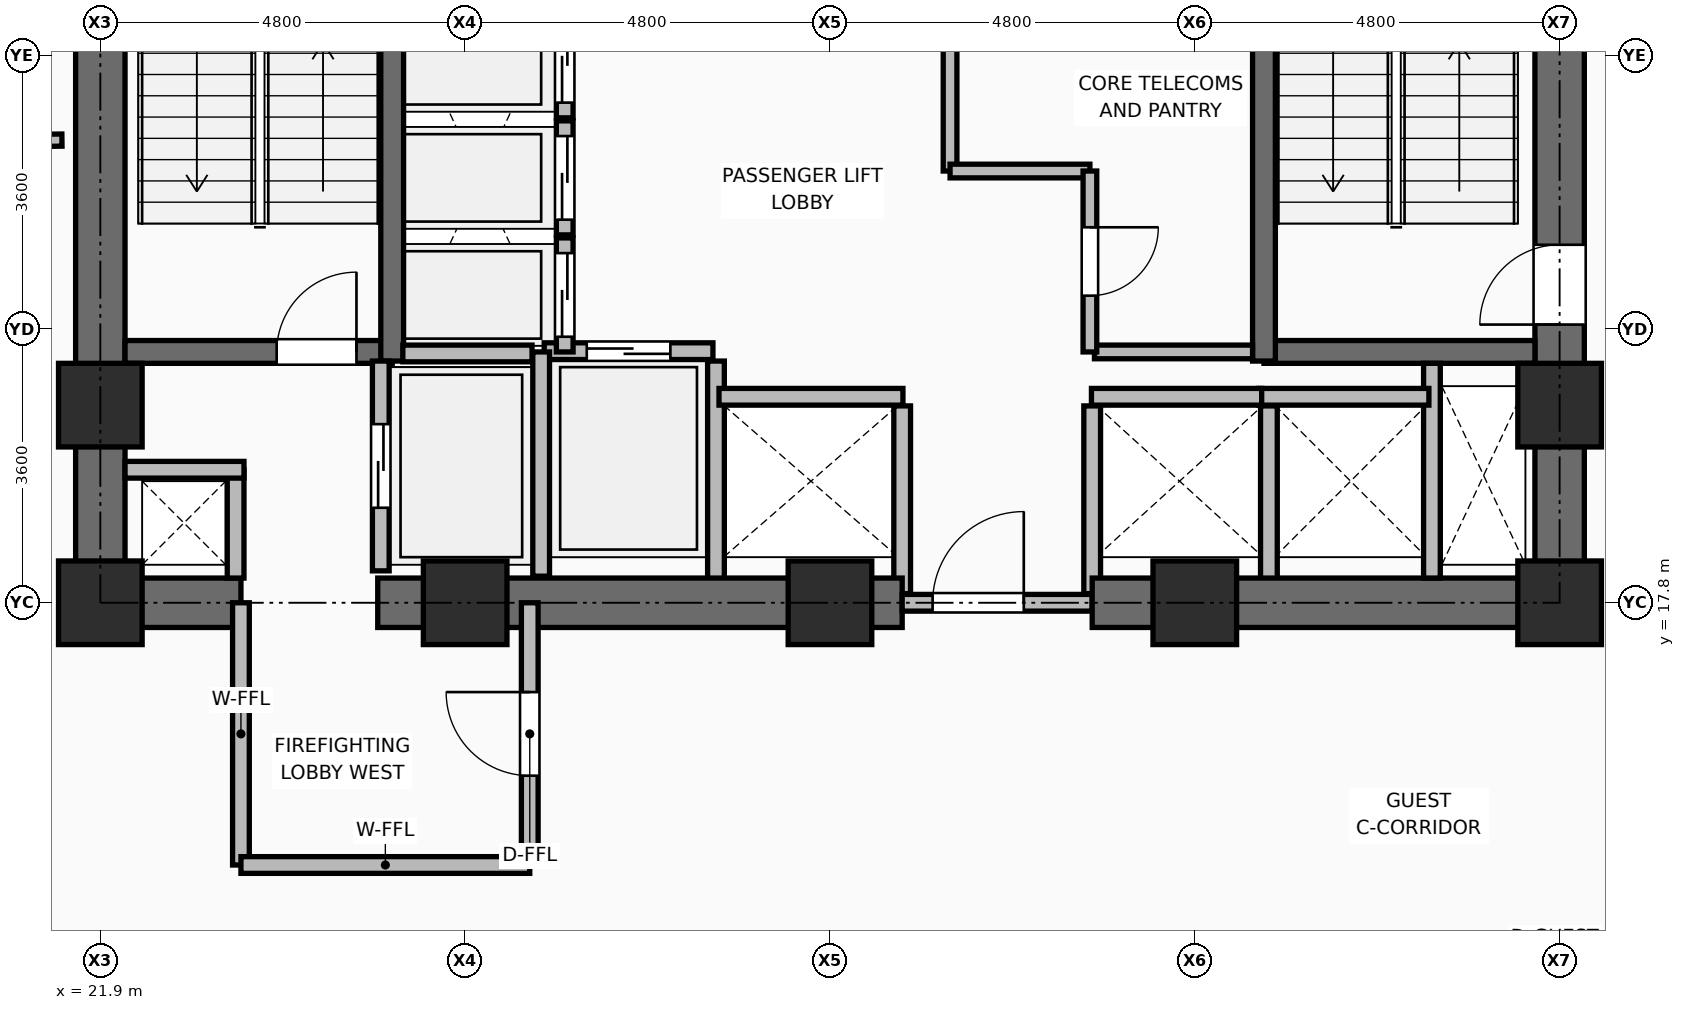
"""IFC4 building model, lengths in metres.
Left out: names, types, materials, properties, quantities, classifications, styles, units other than length and angle.
Written with IfcOpenShell. Run it as: python <this file> out.ifc"""

import sys

from ifc_helpers import new_model, si_unit, direction, frame, frame_2d, origin, origin_2d, place, context, subcontext, project, spatial, rectangle, extrude, element, fill, save


model = new_model("IFC4")
c1 = context("Model", 3, precision=1e-05, world=origin(), true_north=direction((0.0, 1.0)))
c2 = subcontext(c1, "Body", "Model", "MODEL_VIEW")
j1 = project(units=[si_unit("LENGTHUNIT", "METRE"), si_unit("PLANEANGLEUNIT", "RADIAN")], contexts=[c1])
p1 = place(None, origin())
s1 = spatial("IfcSite", under=j1, at=p1, CompositionType="ELEMENT")
p2 = place(p1, origin())
s2 = spatial("IfcBuilding", under=s1, at=p2, CompositionType="ELEMENT")
p3 = place(p2, frame((0.0, 0.0, 49.5)))
s3 = spatial("IfcBuildingStorey", under=s2, at=p3, CompositionType="ELEMENT", Elevation=49.5)
for number, where, z_axis, x_axis in (
    (1, (21.9, 17.8, 0.0), (0.0, 0.0, 1.0), (1.0, 0.0, 0.0)),
    (2, (26.7, 17.8, 0.0), (0.0, 0.0, 1.0), (1.0, 0.0, 0.0)),
    (3, (31.5, 17.8, 0.0), (0.0, 0.0, 1.0), (1.0, 0.0, 0.0)),
    (4, (36.3, 17.8, 0.0), (0.0, 0.0, 1.0), (1.0, 0.0, 0.0)),
    (5, (41.1, 17.8, 0.0), (0.0, 0.0, 1.0), (1.0, 0.0, 0.0)),
    (6, (21.9, 20.4, 0.0), (0.0, 0.0, 1.0), (1.0, 0.0, 0.0)),
    (7, (41.1, 20.4, 0.0), (0.0, 0.0, 1.0), (1.0, 0.0, 0.0)),
):
    element("IfcColumn", number, at=place(p3, frame(where, z_axis=z_axis, x_axis=x_axis)), inside=s3, PredefinedType="COLUMN", context=c2, shape_type="SweptSolid", body=[
        extrude(rectangle(XDim=1.1, YDim=1.1, at=origin_2d()), origin(), (0.0, 0.0, 1.0), 3.75),
    ])
p4 = place(p3, frame((30.0, 18.08, 0.0), z_axis=(0.0, 0.0, 1.0), x_axis=(0.0, 1.0, 0.0)))
e8 = element("IfcWall", 8, at=p4, inside=s3, PredefinedType="PARTITIONING", context=c2, shape_type="SweptSolid", body=[
    extrude(rectangle(XDim=2.9, YDim=0.22, at=frame_2d((1.45, 0.0))), origin(), (0.0, 0.0, 1.0), 3.545),
])
for number, where, z_axis, x_axis in (
    (9, (32.45, 17.92, 0.0), (0.0, 0.0, 1.0), (0.0, 1.0, 0.0)),
    (10, (34.95, 17.92, 0.0), (0.0, 0.0, 1.0), (0.0, 1.0, 0.0)),
):
    element("IfcWall", number, at=place(p3, frame(where, z_axis=z_axis, x_axis=x_axis)), inside=s3, PredefinedType="PARTITIONING", context=c2, shape_type="SweptSolid", body=[
        extrude(rectangle(XDim=2.47, YDim=0.22, at=frame_2d((1.235, 0.0))), origin(), (0.0, 0.0, 1.0), 2.928),
    ])
p5 = place(p3, frame((37.275, 18.08, 0.0), z_axis=(0.0, 0.0, 1.0), x_axis=(0.0, 1.0, 0.0)))
e11 = element("IfcWall", 11, at=p5, inside=s3, PredefinedType="PARTITIONING", context=c2, shape_type="SweptSolid", body=[
    extrude(rectangle(XDim=2.31, YDim=0.22, at=frame_2d((1.155, 0.0))), origin(), (0.0, 0.0, 1.0), 3.545),
])
p6 = place(p3, frame((21.575, 17.8, 0.0), z_axis=(0.0, 0.0, 1.0), x_axis=(1.0, 0.0, 0.0)))
e12 = element("IfcWall", 12, at=p6, inside=s3, PredefinedType="SHEAR", context=c2, shape_type="SweptSolid", body=[
    extrude(rectangle(XDim=2.175, YDim=0.65, at=frame_2d((1.087, 0.0))), origin(), (0.0, 0.0, 1.0), 3.57),
])
p7 = place(p3, frame((25.55, 17.8, 0.0), z_axis=(0.0, 0.0, 1.0), x_axis=(1.0, 0.0, 0.0)))
e13 = element("IfcWall", 13, at=p7, inside=s3, PredefinedType="SHEAR", context=c2, shape_type="SweptSolid", body=[
    extrude(rectangle(XDim=6.9, YDim=0.65, at=frame_2d((3.45, 0.0))), origin(), (0.0, 0.0, 1.0), 3.57),
])
p8 = place(p3, frame((32.45, 17.8, 0.0), z_axis=(0.0, 0.0, 1.0), x_axis=(1.0, 0.0, 0.0)))
e14 = element("IfcWall", 14, at=p8, inside=s3, PredefinedType="PARTITIONING", context=c2, shape_type="SweptSolid", body=[
    extrude(rectangle(XDim=2.5, YDim=0.22, at=frame_2d((1.25, 0.0))), origin(), (0.0, 0.0, 1.0), 2.928),
])
p9 = place(p8, frame((0.4, 0.0, 0.0)))
e15 = element("IfcOpeningElement", 15, at=p9, cuts=e14, PredefinedType="OPENING", context=c2, shape_type="SweptSolid", body=[
    extrude(rectangle(XDim=1.2, YDim=2.1, at=frame_2d((0.6, 1.05))), frame((0.0, 0.12, 0.0), z_axis=(0.0, -1.0, 0.0), x_axis=(1.0, 0.0, 0.0)), (0.0, 0.0, 1.0), 0.24),
])
p10 = place(p3, frame((34.95, 17.8, 0.0), z_axis=(0.0, 0.0, 1.0), x_axis=(1.0, 0.0, 0.0)))
e16 = element("IfcWall", 16, at=p10, inside=s3, PredefinedType="SHEAR", context=c2, shape_type="SweptSolid", body=[
    extrude(rectangle(XDim=6.475, YDim=0.65, at=frame_2d((3.238, 0.0))), origin(), (0.0, 0.0, 1.0), 3.57),
])
p11 = place(p3, frame((21.9, 18.125, 0.0), z_axis=(0.0, 0.0, 1.0), x_axis=(0.0, 1.0, 0.0)))
e17 = element("IfcWall", 17, at=p11, inside=s3, PredefinedType="SHEAR", context=c2, shape_type="SweptSolid", body=[
    extrude(rectangle(XDim=14.0, YDim=0.65, at=frame_2d((7.0, 0.0))), origin(), (0.0, 0.0, 1.0), 3.57),
])
p12 = place(p3, frame((41.1, 18.125, 0.0), z_axis=(0.0, 0.0, 1.0), x_axis=(0.0, 1.0, 0.0)))
e18 = element("IfcWall", 18, at=p12, inside=s3, PredefinedType="SHEAR", context=c2, shape_type="SweptSolid", body=[
    extrude(rectangle(XDim=14.0, YDim=0.65, at=frame_2d((7.0, 0.0))), origin(), (0.0, 0.0, 1.0), 3.57),
])
p13 = place(p12, frame((3.335, 0.0, 0.0)))
e19 = element("IfcOpeningElement", 19, at=p13, cuts=e18, PredefinedType="OPENING", context=c2, shape_type="SweptSolid", body=[
    extrude(rectangle(XDim=1.05, YDim=2.1, at=frame_2d((0.525, 1.05))), frame((0.0, 0.335, 0.0), z_axis=(0.0, -1.0, 0.0), x_axis=(1.0, 0.0, 0.0)), (0.0, 0.0, 1.0), 0.67),
])
p14 = place(p3, frame((22.225, 21.1, 0.0), z_axis=(0.0, 0.0, 1.0), x_axis=(1.0, 0.0, 0.0)))
e20 = element("IfcWall", 20, at=p14, inside=s3, PredefinedType="SHEAR", context=c2, shape_type="SweptSolid", body=[
    extrude(rectangle(XDim=3.515, YDim=0.3, at=frame_2d((1.757, 0.0))), origin(), (0.0, 0.0, 1.0), 3.57),
])
p15 = place(p14, frame((1.995, 0.0, 0.0)))
e21 = element("IfcOpeningElement", 21, at=p15, cuts=e20, PredefinedType="OPENING", context=c2, shape_type="SweptSolid", body=[
    extrude(rectangle(XDim=1.05, YDim=2.1, at=frame_2d((0.525, 1.05))), frame((0.0, 0.16, 0.0), z_axis=(0.0, -1.0, 0.0), x_axis=(1.0, 0.0, 0.0)), (0.0, 0.0, 1.0), 0.32),
])
p16 = place(p3, frame((25.74, 20.98, 0.0), z_axis=(0.0, 0.0, 1.0), x_axis=(0.0, 1.0, 0.0)))
e22 = element("IfcWall", 22, at=p16, inside=s3, PredefinedType="SHEAR", context=c2, shape_type="SweptSolid", body=[
    extrude(rectangle(XDim=7.99, YDim=0.3, at=frame_2d((3.995, 0.0))), origin(), (0.0, 0.0, 1.0), 3.57),
])
p17 = place(p3, frame((37.21, 21.1, 0.0), z_axis=(0.0, 0.0, 1.0), x_axis=(1.0, 0.0, 0.0)))
e23 = element("IfcWall", 23, at=p17, inside=s3, PredefinedType="SHEAR", context=c2, shape_type="SweptSolid", body=[
    extrude(rectangle(XDim=3.565, YDim=0.3, at=frame_2d((1.782, 0.0))), origin(), (0.0, 0.0, 1.0), 3.57),
])
p18 = place(p3, frame((37.21, 20.98, 0.0), z_axis=(0.0, 0.0, 1.0), x_axis=(0.0, 1.0, 0.0)))
e24 = element("IfcWall", 24, at=p18, inside=s3, PredefinedType="SHEAR", context=c2, shape_type="SweptSolid", body=[
    extrude(rectangle(XDim=7.99, YDim=0.3, at=frame_2d((3.995, 0.0))), origin(), (0.0, 0.0, 1.0), 3.57),
])
p19 = place(p3, frame((23.68, 18.125, 0.0), z_axis=(0.0, 0.0, 1.0), x_axis=(0.0, 1.0, 0.0)))
e25 = element("IfcWall", 25, at=p19, inside=s3, PredefinedType="PARTITIONING", context=c2, shape_type="SweptSolid", body=[
    extrude(rectangle(XDim=1.425, YDim=0.22, at=frame_2d((0.712, 0.0))), origin(), (0.0, 0.0, 1.0), 3.55),
])
p20 = place(p3, frame((22.225, 19.55, 0.0), z_axis=(0.0, 0.0, 1.0), x_axis=(1.0, 0.0, 0.0)))
e26 = element("IfcWall", 26, at=p20, inside=s3, PredefinedType="PARTITIONING", context=c2, shape_type="SweptSolid", body=[
    extrude(rectangle(XDim=1.565, YDim=0.22, at=frame_2d((0.782, 0.0))), origin(), (0.0, 0.0, 1.0), 2.595),
])
p21 = place(p3, frame((39.42, 18.125, 0.0), z_axis=(0.0, 0.0, 1.0), x_axis=(0.0, 1.0, 0.0)))
e27 = element("IfcWall", 27, at=p21, inside=s3, PredefinedType="PARTITIONING", context=c2, shape_type="SweptSolid", body=[
    extrude(rectangle(XDim=2.825, YDim=0.22, at=frame_2d((1.413, 0.0))), origin(), (0.0, 0.0, 1.0), 3.55),
])
p22 = place(p3, frame((25.59, 18.22, 0.0), z_axis=(0.0, 0.0, 1.0), x_axis=(0.0, 1.0, 0.0)))
e28 = element("IfcWall", 28, at=p22, inside=s3, PredefinedType="PARTITIONING", context=c2, shape_type="SweptSolid", body=[
    extrude(rectangle(XDim=2.76, YDim=0.22, at=frame_2d((1.38, 0.0))), origin(), (0.0, 0.0, 1.0), 3.55),
])
p23 = place(p22, frame((0.83, 0.0, 0.0)))
e29 = element("IfcOpeningElement", 29, at=p23, cuts=e28, PredefinedType="OPENING", context=c2, shape_type="SweptSolid", body=[
    extrude(rectangle(XDim=1.1, YDim=2.2, at=frame_2d((0.55, 1.1))), frame((0.0, 0.12, 0.0), z_axis=(0.0, -1.0, 0.0), x_axis=(1.0, 0.0, 0.0)), (0.0, 0.0, 1.0), 0.24),
])
p24 = place(p3, frame((27.74, 21.11, 0.0), z_axis=(0.0, 0.0, 1.0), x_axis=(1.0, 0.0, 0.0)))
e30 = element("IfcWall", 30, at=p24, inside=s3, PredefinedType="PARTITIONING", context=c2, shape_type="SweptSolid", body=[
    extrude(rectangle(XDim=2.22, YDim=0.22, at=frame_2d((1.11, 0.0))), origin(), (0.0, 0.0, 1.0), 3.55),
])
p25 = place(p24, frame((0.56, 0.0, 0.0)))
e31 = element("IfcOpeningElement", 31, at=p25, cuts=e30, PredefinedType="OPENING", context=c2, shape_type="SweptSolid", body=[
    extrude(rectangle(XDim=1.1, YDim=2.2, at=frame_2d((0.55, 1.1))), frame((0.0, 0.12, 0.0), z_axis=(0.0, -1.0, 0.0), x_axis=(1.0, 0.0, 0.0)), (0.0, 0.0, 1.0), 0.24),
])
p26 = place(p3, frame((30.04, 20.51, 0.0), z_axis=(0.0, 0.0, 1.0), x_axis=(1.0, 0.0, 0.0)))
e32 = element("IfcWall", 32, at=p26, inside=s3, PredefinedType="PARTITIONING", context=c2, shape_type="SweptSolid", body=[
    extrude(rectangle(XDim=2.42, YDim=0.22, at=frame_2d((1.21, 0.0))), origin(), (0.0, 0.0, 1.0), 3.55),
])
for number, where, z_axis, x_axis in (
    (33, (37.14, 20.51, 0.0), (0.0, 0.0, 1.0), (1.0, 0.0, 0.0)),
    (34, (34.94, 20.51, 0.0), (0.0, 0.0, 1.0), (1.0, 0.0, 0.0)),
):
    element("IfcWall", number, at=place(p3, frame(where, z_axis=z_axis, x_axis=x_axis)), inside=s3, PredefinedType="PARTITIONING", context=c2, shape_type="SweptSolid", body=[
        extrude(rectangle(XDim=2.24, YDim=0.22, at=frame_2d((1.12, 0.0))), origin(), (0.0, 0.0, 1.0), 3.55),
    ])
p27 = place(p3, frame((28.01, 21.1, 0.0), z_axis=(0.0, 0.0, 1.0), x_axis=(0.0, 1.0, 0.0)))
e35 = element("IfcWall", 35, at=p27, inside=s3, PredefinedType="PARTITIONING", context=c2, shape_type="SweptSolid", body=[
    extrude(rectangle(XDim=1.5, YDim=0.22, at=frame_2d((0.75, 0.0))), origin(), (0.0, 0.0, 1.0), 3.55),
])
p28 = place(p27, frame((0.2, 0.0, 0.0)))
e36 = element("IfcOpeningElement", 36, at=p28, cuts=e35, PredefinedType="OPENING", context=c2, shape_type="SweptSolid", body=[
    extrude(rectangle(XDim=1.1, YDim=2.2, at=frame_2d((0.55, 1.1))), frame((0.0, 0.12, 0.0), z_axis=(0.0, -1.0, 0.0), x_axis=(1.0, 0.0, 0.0)), (0.0, 0.0, 1.0), 0.24),
])
p29 = place(p3, frame((28.01, 22.64, 0.0), z_axis=(0.0, 0.0, 1.0), x_axis=(0.0, 1.0, 0.0)))
e37 = element("IfcWall", 37, at=p29, inside=s3, PredefinedType="PARTITIONING", context=c2, shape_type="SweptSolid", body=[
    extrude(rectangle(XDim=1.5, YDim=0.22, at=frame_2d((0.75, 0.0))), origin(), (0.0, 0.0, 1.0), 3.55),
])
p30 = place(p29, frame((0.2, 0.0, 0.0)))
e38 = element("IfcOpeningElement", 38, at=p30, cuts=e37, PredefinedType="OPENING", context=c2, shape_type="SweptSolid", body=[
    extrude(rectangle(XDim=1.1, YDim=2.2, at=frame_2d((0.55, 1.1))), frame((0.0, 0.12, 0.0), z_axis=(0.0, -1.0, 0.0), x_axis=(1.0, 0.0, 0.0)), (0.0, 0.0, 1.0), 0.24),
])
p31 = place(p3, frame((28.01, 24.18, 0.0), z_axis=(0.0, 0.0, 1.0), x_axis=(0.0, 1.0, 0.0)))
e39 = element("IfcWall", 39, at=p31, inside=s3, PredefinedType="PARTITIONING", context=c2, shape_type="SweptSolid", body=[
    extrude(rectangle(XDim=1.5, YDim=0.22, at=frame_2d((0.75, 0.0))), origin(), (0.0, 0.0, 1.0), 3.55),
])
p32 = place(p31, frame((0.2, 0.0, 0.0)))
e40 = element("IfcOpeningElement", 40, at=p32, cuts=e39, PredefinedType="OPENING", context=c2, shape_type="SweptSolid", body=[
    extrude(rectangle(XDim=1.1, YDim=2.2, at=frame_2d((0.55, 1.1))), frame((0.0, 0.12, 0.0), z_axis=(0.0, -1.0, 0.0), x_axis=(1.0, 0.0, 0.0)), (0.0, 0.0, 1.0), 0.24),
])
p33 = place(p3, frame((27.7, 18.15, 0.0), z_axis=(0.0, 0.0, 1.0), x_axis=(0.0, 1.0, 0.0)))
e41 = element("IfcWall", 41, at=p33, inside=s3, PredefinedType="PARTITIONING", context=c2, shape_type="SweptSolid", body=[
    extrude(rectangle(XDim=2.95, YDim=0.22, at=frame_2d((1.475, 0.0))), origin(), (0.0, 0.0, 1.0), 3.55),
])
p34 = place(p3, frame((25.88, 21.08, 0.0), z_axis=(0.0, 0.0, 1.0), x_axis=(1.0, 0.0, 0.0)))
e42 = element("IfcWall", 42, at=p34, inside=s3, PredefinedType="PARTITIONING", context=c2, shape_type="SweptSolid", body=[
    extrude(rectangle(XDim=1.7, YDim=0.22, at=frame_2d((0.85, 0.0))), origin(), (0.0, 0.0, 1.0), 3.55),
])
p35 = place(p3, frame((34.98, 21.1, 0.0), z_axis=(0.0, 0.0, 1.0), x_axis=(1.0, 0.0, 0.0)))
e43 = element("IfcWall", 43, at=p35, inside=s3, PredefinedType="PARTITIONING", context=c2, shape_type="SweptSolid", body=[
    extrude(rectangle(XDim=2.08, YDim=0.18, at=frame_2d((1.04, 0.0))), origin(), (0.0, 0.0, 1.0), 3.55),
])
p36 = place(p3, frame((33.08, 23.48, 0.0), z_axis=(0.0, 0.0, 1.0), x_axis=(0.0, 1.0, 0.0)))
e44 = element("IfcWall", 44, at=p36, inside=s3, PredefinedType="PARTITIONING", context=c2, shape_type="SweptSolid", body=[
    extrude(rectangle(XDim=2.17, YDim=0.18, at=frame_2d((1.085, 0.0))), origin(), (0.0, 0.0, 1.0), 3.55),
])
p37 = place(p3, frame((33.08, 23.48, 0.0), z_axis=(0.0, 0.0, 1.0), x_axis=(1.0, 0.0, 0.0)))
e45 = element("IfcWall", 45, at=p37, inside=s3, PredefinedType="PARTITIONING", context=c2, shape_type="SweptSolid", body=[
    extrude(rectangle(XDim=1.84, YDim=0.18, at=frame_2d((0.92, 0.0))), origin(), (0.0, 0.0, 1.0), 3.55),
])
p38 = place(p3, frame((34.92, 21.1, 0.0), z_axis=(0.0, 0.0, 1.0), x_axis=(0.0, 1.0, 0.0)))
e46 = element("IfcWall", 46, at=p38, inside=s3, PredefinedType="PARTITIONING", context=c2, shape_type="SweptSolid", body=[
    extrude(rectangle(XDim=2.38, YDim=0.18, at=frame_2d((1.19, 0.0))), origin(), (0.0, 0.0, 1.0), 3.55),
])
p39 = place(p38, frame((0.74, 0.0, 0.0)))
e47 = element("IfcOpeningElement", 47, at=p39, cuts=e46, PredefinedType="OPENING", context=c2, shape_type="SweptSolid", body=[
    extrude(rectangle(XDim=0.9, YDim=2.1, at=frame_2d((0.45, 1.05))), frame((0.0, 0.1, 0.0), z_axis=(0.0, -1.0, 0.0), x_axis=(1.0, 0.0, 0.0)), (0.0, 0.0, 1.0), 0.2),
])
p40 = place(p3, frame((23.75, 14.35, 0.0), z_axis=(0.0, 0.0, 1.0), x_axis=(0.0, 1.0, 0.0)))
e48 = element("IfcWall", 48, at=p40, inside=s3, PredefinedType="PARTITIONING", context=c2, shape_type="SweptSolid", body=[
    extrude(rectangle(XDim=3.45, YDim=0.22, at=frame_2d((1.725, 0.0))), origin(), (0.0, 0.0, 1.0), 2.928),
])
p41 = place(p3, frame((23.75, 14.35, 0.0), z_axis=(0.0, 0.0, 1.0), x_axis=(1.0, 0.0, 0.0)))
e49 = element("IfcWall", 49, at=p41, inside=s3, PredefinedType="PARTITIONING", context=c2, shape_type="SweptSolid", body=[
    extrude(rectangle(XDim=3.8, YDim=0.22, at=frame_2d((1.9, 0.0))), origin(), (0.0, 0.0, 1.0), 3.55),
])
p42 = place(p3, frame((27.55, 14.35, 0.0), z_axis=(0.0, 0.0, 1.0), x_axis=(0.0, 1.0, 0.0)))
e50 = element("IfcWall", 50, at=p42, inside=s3, PredefinedType="PARTITIONING", context=c2, shape_type="SweptSolid", body=[
    extrude(rectangle(XDim=3.45, YDim=0.22, at=frame_2d((1.725, 0.0))), origin(), (0.0, 0.0, 1.0), 2.928),
])
p43 = place(p42, frame((1.175, 0.0, 0.0)))
e51 = element("IfcOpeningElement", 51, at=p43, cuts=e50, PredefinedType="OPENING", context=c2, shape_type="SweptSolid", body=[
    extrude(rectangle(XDim=1.1, YDim=2.1, at=frame_2d((0.55, 1.05))), frame((0.0, 0.12, 0.0), z_axis=(0.0, -1.0, 0.0), x_axis=(1.0, 0.0, 0.0)), (0.0, 0.0, 1.0), 0.24),
])
p44 = place(p3, frame((19.111, 23.858, 0.0), z_axis=(0.0, 0.0, 1.0), x_axis=(0.999919104634, 0.01271944131, 0.0)))
e52 = element("IfcWall", 52, at=p44, inside=s3, PredefinedType="PARTITIONING", context=c2, shape_type="SweptSolid", body=[
    extrude(rectangle(XDim=2.284, YDim=0.16, at=frame_2d((1.142, 0.0))), origin(), (0.0, 0.0, 1.0), 3.55),
])
p45 = place(p9, origin())
e53 = element("IfcDoor", 53, at=p45, inside=s3, OperationType="SINGLE_SWING_RIGHT", PredefinedType="DOOR", context=c2, shape_type="SweptSolid", body=[
    extrude(rectangle(XDim=1.2, YDim=2.1, at=frame_2d((0.6, 1.05))), frame((0.0, 0.025, 0.0), z_axis=(0.0, -1.0, 0.0), x_axis=(1.0, 0.0, 0.0)), (0.0, 0.0, 1.0), 0.05),
])
fill(e15, e53)
p46 = place(p15, origin())
e54 = element("IfcDoor", 54, at=p46, inside=s3, OperationType="SINGLE_SWING_RIGHT", PredefinedType="DOOR", context=c2, shape_type="SweptSolid", body=[
    extrude(rectangle(XDim=1.05, YDim=2.1, at=frame_2d((0.525, 1.05))), frame((0.0, 0.025, 0.0), z_axis=(0.0, -1.0, 0.0), x_axis=(1.0, 0.0, 0.0)), (0.0, 0.0, 1.0), 0.05),
])
fill(e21, e54)
p47 = place(p13, origin())
e55 = element("IfcDoor", 55, at=p47, inside=s3, OperationType="SINGLE_SWING_LEFT", PredefinedType="DOOR", context=c2, shape_type="SweptSolid", body=[
    extrude(rectangle(XDim=1.05, YDim=2.1, at=frame_2d((0.525, 1.05))), frame((0.0, 0.025, 0.0), z_axis=(0.0, -1.0, 0.0), x_axis=(1.0, 0.0, 0.0)), (0.0, 0.0, 1.0), 0.05),
])
fill(e19, e55)
p48 = place(p23, origin())
e56 = element("IfcDoor", 56, at=p48, inside=s3, OperationType="DOUBLE_DOOR_SLIDING", PredefinedType="DOOR", context=c2, shape_type="SweptSolid", body=[
    extrude(rectangle(XDim=1.1, YDim=2.2, at=frame_2d((0.55, 1.1))), frame((0.0, 0.025, 0.0), z_axis=(0.0, -1.0, 0.0), x_axis=(1.0, 0.0, 0.0)), (0.0, 0.0, 1.0), 0.05),
])
fill(e29, e56)
p49 = place(p25, origin())
e57 = element("IfcDoor", 57, at=p49, inside=s3, OperationType="DOUBLE_DOOR_SLIDING", PredefinedType="DOOR", context=c2, shape_type="SweptSolid", body=[
    extrude(rectangle(XDim=1.1, YDim=2.2, at=frame_2d((0.55, 1.1))), frame((0.0, 0.025, 0.0), z_axis=(0.0, -1.0, 0.0), x_axis=(1.0, 0.0, 0.0)), (0.0, 0.0, 1.0), 0.05),
])
fill(e31, e57)
p50 = place(p28, frame((1.1, 0.0, 0.0), z_axis=(0.0, 0.0, 1.0), x_axis=(-1.0, 0.0, 0.0)))
e58 = element("IfcDoor", 58, at=p50, inside=s3, OperationType="DOUBLE_DOOR_SLIDING", PredefinedType="DOOR", context=c2, shape_type="SweptSolid", body=[
    extrude(rectangle(XDim=1.1, YDim=2.2, at=frame_2d((0.55, 1.1))), frame((0.0, 0.025, 0.0), z_axis=(0.0, -1.0, 0.0), x_axis=(1.0, 0.0, 0.0)), (0.0, 0.0, 1.0), 0.05),
])
fill(e36, e58)
p51 = place(p30, frame((1.1, 0.0, 0.0), z_axis=(0.0, 0.0, 1.0), x_axis=(-1.0, 0.0, 0.0)))
e59 = element("IfcDoor", 59, at=p51, inside=s3, OperationType="DOUBLE_DOOR_SLIDING", PredefinedType="DOOR", context=c2, shape_type="SweptSolid", body=[
    extrude(rectangle(XDim=1.1, YDim=2.2, at=frame_2d((0.55, 1.1))), frame((0.0, 0.025, 0.0), z_axis=(0.0, -1.0, 0.0), x_axis=(1.0, 0.0, 0.0)), (0.0, 0.0, 1.0), 0.05),
])
fill(e38, e59)
p52 = place(p32, frame((1.1, 0.0, 0.0), z_axis=(0.0, 0.0, 1.0), x_axis=(-1.0, 0.0, 0.0)))
e60 = element("IfcDoor", 60, at=p52, inside=s3, OperationType="DOUBLE_DOOR_SLIDING", PredefinedType="DOOR", context=c2, shape_type="SweptSolid", body=[
    extrude(rectangle(XDim=1.1, YDim=2.2, at=frame_2d((0.55, 1.1))), frame((0.0, 0.025, 0.0), z_axis=(0.0, -1.0, 0.0), x_axis=(1.0, 0.0, 0.0)), (0.0, 0.0, 1.0), 0.05),
])
fill(e40, e60)
p53 = place(p39, frame((0.9, 0.0, 0.0), z_axis=(0.0, 0.0, 1.0), x_axis=(-1.0, 0.0, 0.0)))
e61 = element("IfcDoor", 61, at=p53, inside=s3, OperationType="SINGLE_SWING_LEFT", PredefinedType="DOOR", context=c2, shape_type="SweptSolid", body=[
    extrude(rectangle(XDim=0.9, YDim=2.1, at=frame_2d((0.45, 1.05))), frame((0.0, 0.025, 0.0), z_axis=(0.0, -1.0, 0.0), x_axis=(1.0, 0.0, 0.0)), (0.0, 0.0, 1.0), 0.05),
])
fill(e47, e61)
p54 = place(p43, origin())
e62 = element("IfcDoor", 62, at=p54, inside=s3, OperationType="SINGLE_SWING_RIGHT", PredefinedType="DOOR", context=c2, shape_type="SweptSolid", body=[
    extrude(rectangle(XDim=1.1, YDim=2.1, at=frame_2d((0.55, 1.05))), frame((0.0, 0.025, 0.0), z_axis=(0.0, -1.0, 0.0), x_axis=(1.0, 0.0, 0.0)), (0.0, 0.0, 1.0), 0.05),
])
fill(e51, e62)
save(model, sys.argv[1])
